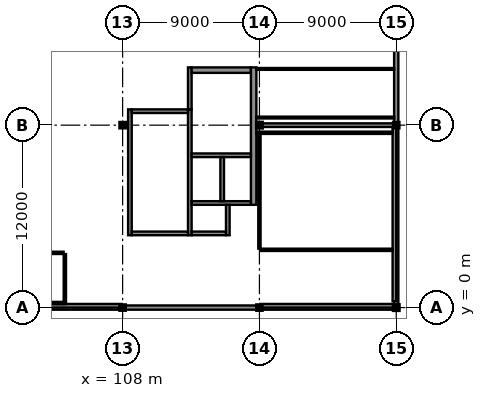
"""IFC4 building model, lengths in metres.
Left out: names, types, materials, properties, quantities, classifications, styles, units other than length and angle.
Written with IfcOpenShell. Run it as: python <this file> out.ifc"""

import sys

from ifc_helpers import new_model, si_unit, direction, frame, frame_2d, origin, origin_2d, place, context, subcontext, project, spatial, rectangle, i_section, extrude, element, fill, save


model = new_model("IFC4")
c1 = context("Model", 3, precision=1e-05, world=origin(), true_north=direction((0.0, 1.0)))
c2 = subcontext(c1, "Body", "Model", "MODEL_VIEW")
j1 = project(units=[si_unit("LENGTHUNIT", "METRE"), si_unit("PLANEANGLEUNIT", "RADIAN")], contexts=[c1])
p1 = place(None, origin())
s1 = spatial("IfcSite", under=j1, at=p1, CompositionType="ELEMENT")
p2 = place(p1, origin())
s2 = spatial("IfcBuilding", under=s1, at=p2, CompositionType="ELEMENT")
p3 = place(p2, frame((0.0, 0.0, 35.4)))
s3 = spatial("IfcBuildingStorey", under=s2, at=p3, CompositionType="ELEMENT", Elevation=35.4)
for number, where, z_axis, x_axis in (
    (1, (108.0, 0.0, 0.0), (0.0, 0.0, 1.0), (1.0, 0.0, 0.0)),
    (2, (108.0, 12.0, 0.0), (0.0, 0.0, 1.0), (1.0, 0.0, 0.0)),
    (3, (117.0, 0.0, 0.0), (0.0, 0.0, 1.0), (1.0, 0.0, 0.0)),
):
    element("IfcColumn", number, at=place(p3, frame(where, z_axis=z_axis, x_axis=x_axis)), inside=s3, PredefinedType="COLUMN", context=c2, shape_type="SweptSolid", body=[
        extrude(i_section(OverallWidth=0.26, OverallDepth=0.26, WebThickness=0.01, FlangeThickness=0.018, at=origin_2d()), origin(), (0.0, 0.0, 1.0), 3.8),
    ])
for number, where, z_axis, x_axis in (
    (4, (117.0, 12.0, 0.0), (0.0, 0.0, 1.0), (0.0, 1.0, 0.0)),
    (5, (126.0, 0.0, 0.0), (0.0, 0.0, 1.0), (1.0, 0.0, 0.0)),
):
    element("IfcColumn", number, at=place(p3, frame(where, z_axis=z_axis, x_axis=x_axis)), inside=s3, PredefinedType="COLUMN", context=c2, shape_type="SweptSolid", body=[
        extrude(i_section(OverallWidth=0.28, OverallDepth=0.28, WebThickness=0.01, FlangeThickness=0.018, at=origin_2d()), origin(), (0.0, 0.0, 1.0), 3.8),
    ])
p4 = place(p3, frame((126.0, 12.0, 0.0), z_axis=(0.0, 0.0, 1.0), x_axis=(1.0, 0.0, 0.0)))
e6 = element("IfcColumn", 6, at=p4, inside=s3, PredefinedType="COLUMN", context=c2, shape_type="SweptSolid", body=[
    extrude(i_section(OverallWidth=0.26, OverallDepth=0.26, WebThickness=0.01, FlangeThickness=0.018, at=origin_2d()), origin(), (0.0, 0.0, 1.0), 3.8),
])
p5 = place(p3, frame((99.058, 0.0, 0.0), z_axis=(0.0, 0.0, 1.0), x_axis=(1.0, 0.0, 0.0)))
e7 = element("IfcWall", 7, at=p5, inside=s3, PredefinedType="SOLIDWALL", context=c2, shape_type="SweptSolid", body=[
    extrude(rectangle(XDim=8.934, YDim=0.28, at=frame_2d((4.467, 0.0))), origin(), (0.0, 0.0, 1.0), 3.305),
])
p6 = place(p5, frame((2.03, 0.0, 1.05)))
e8 = element("IfcOpeningElement", 8, at=p6, cuts=e7, PredefinedType="OPENING", context=c2, shape_type="SweptSolid", body=[
    extrude(rectangle(XDim=1.3, YDim=1.3, at=frame_2d((0.65, 0.65))), frame((0.0, 0.155, 0.0), z_axis=(0.0, -1.0, 0.0), x_axis=(1.0, 0.0, 0.0)), (0.0, 0.0, 1.0), 0.31),
])
p7 = place(p5, frame((5.604, 0.0, 1.05)))
e9 = element("IfcOpeningElement", 9, at=p7, cuts=e7, PredefinedType="OPENING", context=c2, shape_type="SweptSolid", body=[
    extrude(rectangle(XDim=1.3, YDim=1.3, at=frame_2d((0.65, 0.65))), frame((0.0, 0.155, 0.0), z_axis=(0.0, -1.0, 0.0), x_axis=(1.0, 0.0, 0.0)), (0.0, 0.0, 1.0), 0.31),
])
p8 = place(p3, frame((108.008, 0.0, 0.0), z_axis=(0.0, 0.0, 1.0), x_axis=(1.0, 0.0, 0.0)))
e10 = element("IfcWall", 10, at=p8, inside=s3, PredefinedType="SOLIDWALL", context=c2, shape_type="SweptSolid", body=[
    extrude(rectangle(XDim=8.984, YDim=0.28, at=frame_2d((4.492, 0.0))), origin(), (0.0, 0.0, 1.0), 3.305),
])
p9 = place(p8, frame((2.045, 0.0, 1.05)))
e11 = element("IfcOpeningElement", 11, at=p9, cuts=e10, PredefinedType="OPENING", context=c2, shape_type="SweptSolid", body=[
    extrude(rectangle(XDim=1.3, YDim=1.3, at=frame_2d((0.65, 0.65))), frame((0.0, 0.155, 0.0), z_axis=(0.0, -1.0, 0.0), x_axis=(1.0, 0.0, 0.0)), (0.0, 0.0, 1.0), 0.31),
])
p10 = place(p8, frame((5.639, 0.0, 1.05)))
e12 = element("IfcOpeningElement", 12, at=p10, cuts=e10, PredefinedType="OPENING", context=c2, shape_type="SweptSolid", body=[
    extrude(rectangle(XDim=1.3, YDim=1.3, at=frame_2d((0.65, 0.65))), frame((0.0, 0.155, 0.0), z_axis=(0.0, -1.0, 0.0), x_axis=(1.0, 0.0, 0.0)), (0.0, 0.0, 1.0), 0.31),
])
p11 = place(p3, frame((117.008, 0.0, 0.0), z_axis=(0.0, 0.0, 1.0), x_axis=(1.0, 0.0, 0.0)))
e13 = element("IfcWall", 13, at=p11, inside=s3, PredefinedType="SOLIDWALL", context=c2, shape_type="SweptSolid", body=[
    extrude(rectangle(XDim=8.984, YDim=0.28, at=frame_2d((4.492, 0.0))), origin(), (0.0, 0.0, 1.0), 3.305),
])
p12 = place(p11, frame((2.045, 0.0, 1.05)))
e14 = element("IfcOpeningElement", 14, at=p12, cuts=e13, PredefinedType="OPENING", context=c2, shape_type="SweptSolid", body=[
    extrude(rectangle(XDim=1.3, YDim=1.3, at=frame_2d((0.65, 0.65))), frame((0.0, 0.155, 0.0), z_axis=(0.0, -1.0, 0.0), x_axis=(1.0, 0.0, 0.0)), (0.0, 0.0, 1.0), 0.31),
])
p13 = place(p11, frame((5.639, 0.0, 1.05)))
e15 = element("IfcOpeningElement", 15, at=p13, cuts=e13, PredefinedType="OPENING", context=c2, shape_type="SweptSolid", body=[
    extrude(rectangle(XDim=1.3, YDim=1.3, at=frame_2d((0.65, 0.65))), frame((0.0, 0.155, 0.0), z_axis=(0.0, -1.0, 0.0), x_axis=(1.0, 0.0, 0.0)), (0.0, 0.0, 1.0), 0.31),
])
p14 = place(p3, frame((126.0, 0.138, 0.0), z_axis=(0.0, 0.0, 1.0), x_axis=(0.0, 1.0, 0.0)))
e16 = element("IfcWall", 16, at=p14, inside=s3, PredefinedType="SOLIDWALL", context=c2, shape_type="SweptSolid", body=[
    extrude(rectangle(XDim=11.734, YDim=0.28, at=frame_2d((5.867, 0.0))), origin(), (0.0, 0.0, 1.0), 3.195),
])
p15 = place(p14, frame((2.022, 0.0, 1.05)))
e17 = element("IfcOpeningElement", 17, at=p15, cuts=e16, PredefinedType="OPENING", context=c2, shape_type="SweptSolid", body=[
    extrude(rectangle(XDim=1.3, YDim=1.3, at=frame_2d((0.65, 0.65))), frame((0.0, 0.155, 0.0), z_axis=(0.0, -1.0, 0.0), x_axis=(1.0, 0.0, 0.0)), (0.0, 0.0, 1.0), 0.31),
])
p16 = place(p14, frame((7.564, 0.0, 1.05)))
e18 = element("IfcOpeningElement", 18, at=p16, cuts=e16, PredefinedType="OPENING", context=c2, shape_type="SweptSolid", body=[
    extrude(rectangle(XDim=1.3, YDim=1.3, at=frame_2d((0.65, 0.65))), frame((0.0, 0.155, 0.0), z_axis=(0.0, -1.0, 0.0), x_axis=(1.0, 0.0, 0.0)), (0.0, 0.0, 1.0), 0.31),
])
p17 = place(p3, frame((126.0, 12.128, 0.0), z_axis=(0.0, 0.0, 1.0), x_axis=(0.0, 1.0, 0.0)))
e19 = element("IfcWall", 19, at=p17, inside=s3, PredefinedType="SOLIDWALL", context=c2, shape_type="SweptSolid", body=[
    extrude(rectangle(XDim=11.649, YDim=0.28, at=frame_2d((5.825, 0.0))), origin(), (0.0, 0.0, 1.0), 3.195),
])
p18 = place(p17, frame((2.032, 0.0, 1.05)))
e20 = element("IfcOpeningElement", 20, at=p18, cuts=e19, PredefinedType="OPENING", context=c2, shape_type="SweptSolid", body=[
    extrude(rectangle(XDim=1.3, YDim=1.3, at=frame_2d((0.65, 0.65))), frame((0.0, 0.155, 0.0), z_axis=(0.0, -1.0, 0.0), x_axis=(1.0, 0.0, 0.0)), (0.0, 0.0, 1.0), 0.31),
])
p19 = place(p17, frame((7.504, 0.0, 1.05)))
e21 = element("IfcOpeningElement", 21, at=p19, cuts=e19, PredefinedType="OPENING", context=c2, shape_type="SweptSolid", body=[
    extrude(rectangle(XDim=1.3, YDim=1.3, at=frame_2d((0.65, 0.65))), frame((0.0, 0.155, 0.0), z_axis=(0.0, -1.0, 0.0), x_axis=(1.0, 0.0, 0.0)), (0.0, 0.0, 1.0), 0.31),
])
p20 = place(p3, frame((99.06, 0.12, 3.8), z_axis=(0.0, 0.0, 1.0), x_axis=(1.0, 0.0, 0.0)))
e22 = element("IfcWall", 22, at=p20, inside=s3, PredefinedType="PARAPET", context=c2, shape_type="SweptSolid", body=[
    extrude(rectangle(XDim=8.88, YDim=0.24, at=frame_2d((4.44, 0.0))), origin(), (0.0, 0.0, 1.0), 1.1),
])
p21 = place(p3, frame((117.06, 0.12, 3.8), z_axis=(0.0, 0.0, 1.0), x_axis=(1.0, 0.0, 0.0)))
e23 = element("IfcWall", 23, at=p21, inside=s3, PredefinedType="PARAPET", context=c2, shape_type="SweptSolid", body=[
    extrude(rectangle(XDim=8.76, YDim=0.24, at=frame_2d((4.38, 0.0))), origin(), (0.0, 0.0, 1.0), 1.1),
])
p22 = place(p3, frame((125.88, 0.42, 3.8), z_axis=(0.0, 0.0, 1.0), x_axis=(0.0, 1.0, 0.0)))
e24 = element("IfcWall", 24, at=p22, inside=s3, PredefinedType="PARAPET", context=c2, shape_type="SweptSolid", body=[
    extrude(rectangle(XDim=11.52, YDim=0.24, at=frame_2d((5.76, 0.0))), origin(), (0.0, 0.0, 1.0), 1.1),
])
p23 = place(p3, frame((108.48, 4.76, 0.0), z_axis=(0.0, 0.0, 1.0), x_axis=(0.0, 1.0, 0.0)))
e25 = element("IfcWall", 25, at=p23, inside=s3, PredefinedType="SHEAR", context=c2, shape_type="SweptSolid", body=[
    extrude(rectangle(XDim=8.28, YDim=0.24, at=frame_2d((4.14, 0.0))), origin(), (0.0, 0.0, 1.0), 3.81),
])
p24 = place(p3, frame((112.42, 4.76, 0.0), z_axis=(0.0, 0.0, 1.0), x_axis=(0.0, 1.0, 0.0)))
e26 = element("IfcWall", 26, at=p24, inside=s3, PredefinedType="SHEAR", context=c2, shape_type="SweptSolid", body=[
    extrude(rectangle(XDim=8.28, YDim=0.24, at=frame_2d((4.14, 0.0))), origin(), (0.0, 0.0, 1.0), 3.81),
])
p25 = place(p24, frame((6.49, 0.0, 0.0)))
e27 = element("IfcOpeningElement", 27, at=p25, cuts=e26, PredefinedType="OPENING", context=c2, shape_type="SweptSolid", body=[
    extrude(rectangle(XDim=1.3, YDim=2.2, at=frame_2d((0.65, 1.1))), frame((0.0, 0.135, 0.0), z_axis=(0.0, -1.0, 0.0), x_axis=(1.0, 0.0, 0.0)), (0.0, 0.0, 1.0), 0.27),
])
for number, where, z_axis, x_axis in (
    (28, (108.6, 4.88, 0.0), (0.0, 0.0, 1.0), (1.0, 0.0, 0.0)),
    (29, (108.6, 12.92, 0.0), (0.0, 0.0, 1.0), (1.0, 0.0, 0.0)),
):
    element("IfcWall", number, at=place(p3, frame(where, z_axis=z_axis, x_axis=x_axis)), inside=s3, PredefinedType="SHEAR", context=c2, shape_type="SweptSolid", body=[
        extrude(rectangle(XDim=3.7, YDim=0.24, at=frame_2d((1.85, 0.0))), origin(), (0.0, 0.0, 1.0), 3.81),
    ])
p26 = place(p3, frame((112.42, 13.04, 0.0), z_axis=(0.0, 0.0, 1.0), x_axis=(0.0, 1.0, 0.0)))
e30 = element("IfcWall", 30, at=p26, inside=s3, PredefinedType="SHEAR", context=c2, shape_type="SweptSolid", body=[
    extrude(rectangle(XDim=2.76, YDim=0.24, at=frame_2d((1.38, 0.0))), origin(), (0.0, 0.0, 1.0), 3.66),
])
p27 = place(p3, frame((112.54, 15.62, 0.0), z_axis=(0.0, 0.0, 1.0), x_axis=(1.0, 0.0, 0.0)))
e31 = element("IfcWall", 31, at=p27, inside=s3, PredefinedType="SHEAR", context=c2, shape_type="SweptSolid", body=[
    extrude(rectangle(XDim=3.9, YDim=0.36, at=frame_2d((1.95, 0.0))), origin(), (0.0, 0.0, 1.0), 3.66),
])
p28 = place(p27, frame((1.15, 0.0, 0.0)))
e32 = element("IfcOpeningElement", 32, at=p28, cuts=e31, PredefinedType="OPENING", context=c2, shape_type="SweptSolid", body=[
    extrude(rectangle(XDim=1.6, YDim=2.25, at=frame_2d((0.8, 1.125))), frame((0.0, 0.195, 0.0), z_axis=(0.0, -1.0, 0.0), x_axis=(1.0, 0.0, 0.0)), (0.0, 0.0, 1.0), 0.39),
])
p29 = place(p3, frame((116.62, 6.76, 0.0), z_axis=(0.0, 0.0, 1.0), x_axis=(0.0, 1.0, 0.0)))
e33 = element("IfcWall", 33, at=p29, inside=s3, PredefinedType="SHEAR", context=c2, shape_type="SweptSolid", body=[
    extrude(rectangle(XDim=9.04, YDim=0.36, at=frame_2d((4.52, 0.0))), origin(), (0.0, 0.0, 1.0), 3.66),
])
p30 = place(p3, frame((112.54, 10.02, 0.0), z_axis=(0.0, 0.0, 1.0), x_axis=(1.0, 0.0, 0.0)))
e34 = element("IfcWall", 34, at=p30, inside=s3, PredefinedType="SHEAR", context=c2, shape_type="SweptSolid", body=[
    extrude(rectangle(XDim=3.9, YDim=0.24, at=frame_2d((1.95, 0.0))), origin(), (0.0, 0.0, 1.0), 3.81),
])
p31 = place(p30, frame((0.235, 0.0, 0.0)))
e35 = element("IfcOpeningElement", 35, at=p31, cuts=e34, PredefinedType="OPENING", context=c2, shape_type="SweptSolid", body=[
    extrude(rectangle(XDim=1.6, YDim=2.3, at=frame_2d((0.8, 1.15))), frame((0.0, 0.135, 0.0), z_axis=(0.0, -1.0, 0.0), x_axis=(1.0, 0.0, 0.0)), (0.0, 0.0, 1.0), 0.27),
])
p32 = place(p30, frame((2.185, 0.0, 0.0)))
e36 = element("IfcOpeningElement", 36, at=p32, cuts=e34, PredefinedType="OPENING", context=c2, shape_type="SweptSolid", body=[
    extrude(rectangle(XDim=1.6, YDim=2.3, at=frame_2d((0.8, 1.15))), frame((0.0, 0.135, 0.0), z_axis=(0.0, -1.0, 0.0), x_axis=(1.0, 0.0, 0.0)), (0.0, 0.0, 1.0), 0.27),
])
p33 = place(p3, frame((112.54, 6.88, 0.0), z_axis=(0.0, 0.0, 1.0), x_axis=(1.0, 0.0, 0.0)))
e37 = element("IfcWall", 37, at=p33, inside=s3, PredefinedType="SHEAR", context=c2, shape_type="SweptSolid", body=[
    extrude(rectangle(XDim=3.9, YDim=0.24, at=frame_2d((1.95, 0.0))), origin(), (0.0, 0.0, 1.0), 3.81),
])
p34 = place(p3, frame((114.55, 7.0, 0.0), z_axis=(0.0, 0.0, 1.0), x_axis=(0.0, 1.0, 0.0)))
e38 = element("IfcWall", 38, at=p34, inside=s3, PredefinedType="SHEAR", context=c2, shape_type="SweptSolid", body=[
    extrude(rectangle(XDim=2.9, YDim=0.24, at=frame_2d((1.45, 0.0))), origin(), (0.0, 0.0, 1.0), 3.81),
])
p35 = place(p3, frame((114.92, 4.76, 0.0), z_axis=(0.0, 0.0, 1.0), x_axis=(0.0, 1.0, 0.0)))
e39 = element("IfcWall", 39, at=p35, inside=s3, PredefinedType="SHEAR", context=c2, shape_type="SweptSolid", body=[
    extrude(rectangle(XDim=2.0, YDim=0.24, at=frame_2d((1.0, 0.0))), origin(), (0.0, 0.0, 1.0), 3.81),
])
p36 = place(p3, frame((112.54, 4.88, 0.0), z_axis=(0.0, 0.0, 1.0), x_axis=(1.0, 0.0, 0.0)))
e40 = element("IfcWall", 40, at=p36, inside=s3, PredefinedType="SHEAR", context=c2, shape_type="SweptSolid", body=[
    extrude(rectangle(XDim=2.26, YDim=0.24, at=frame_2d((1.13, 0.0))), origin(), (0.0, 0.0, 1.0), 3.81),
])
p37 = place(p3, frame((117.138, 12.0, 0.0), z_axis=(0.0, 0.0, 1.0), x_axis=(1.0, 0.0, 0.0)))
e41 = element("IfcWall", 41, at=p37, inside=s3, PredefinedType="SHEAR", context=c2, shape_type="SweptSolid", body=[
    extrude(rectangle(XDim=8.854, YDim=0.24, at=frame_2d((4.427, 0.0))), origin(), (0.0, 0.0, 1.0), 3.255),
])
p38 = place(p3, frame((45.88, 3.6, 0.0), z_axis=(0.0, 0.0, 1.0), x_axis=(1.0, 0.0, 0.0)))
e42 = element("IfcWall", 42, at=p38, inside=s3, PredefinedType="PARTITIONING", context=c2, shape_type="SweptSolid", body=[
    extrude(rectangle(XDim=58.24, YDim=0.15, at=frame_2d((29.12, 0.0))), origin(), (0.0, 0.0, 1.0), 3.64),
])
p39 = place(p38, frame((27.795, 0.0, 0.0)))
e43 = element("IfcOpeningElement", 43, at=p39, cuts=e42, PredefinedType="OPENING", context=c2, shape_type="SweptSolid", body=[
    extrude(rectangle(XDim=1.05, YDim=2.25, at=frame_2d((0.525, 1.125))), frame((0.0, 0.09, 0.0), z_axis=(0.0, -1.0, 0.0), x_axis=(1.0, 0.0, 0.0)), (0.0, 0.0, 1.0), 0.18),
])
p40 = place(p3, frame((104.2, 3.52, 0.0), z_axis=(0.0, 0.0, 1.0), x_axis=(0.0, -1.0, 0.0)))
e44 = element("IfcWall", 44, at=p40, inside=s3, PredefinedType="PARTITIONING", context=c2, shape_type="SweptSolid", body=[
    extrude(rectangle(XDim=3.285, YDim=0.15, at=frame_2d((1.643, 0.0))), origin(), (0.0, 0.0, 1.0), 3.64),
])
p41 = place(p3, frame((104.13, 0.3, 0.0), z_axis=(0.0, 0.0, 1.0), x_axis=(-1.0, 0.0, 0.0)))
e45 = element("IfcWall", 45, at=p41, inside=s3, PredefinedType="PARTITIONING", context=c2, shape_type="SweptSolid", body=[
    extrude(rectangle(XDim=31.851, YDim=0.15, at=frame_2d((15.925, 0.0))), origin(), (0.0, 0.0, 1.0), 3.64),
])
p42 = place(p3, frame((117.0, 3.88, 0.0), z_axis=(0.0, 0.0, 1.0), x_axis=(0.0, 1.0, 0.0)))
e46 = element("IfcWall", 46, at=p42, inside=s3, PredefinedType="PARTITIONING", context=c2, shape_type="SweptSolid", body=[
    extrude(rectangle(XDim=7.54, YDim=0.15, at=frame_2d((3.77, 0.0))), origin(), (0.0, 0.0, 1.0), 3.245),
])
p43 = place(p3, frame((116.795, 11.5, 0.0), z_axis=(0.0, 0.0, 1.0), x_axis=(1.0, 0.0, 0.0)))
e47 = element("IfcWall", 47, at=p43, inside=s3, PredefinedType="PARTITIONING", context=c2, shape_type="SweptSolid", body=[
    extrude(rectangle(XDim=8.97, YDim=0.15, at=frame_2d((4.485, 0.0))), origin(), (0.0, 0.0, 1.0), 3.64),
])
p44 = place(p3, frame((125.765, 3.8, 0.0), z_axis=(0.0, 0.0, 1.0), x_axis=(-1.0, 0.0, 0.0)))
e48 = element("IfcWall", 48, at=p44, inside=s3, PredefinedType="PARTITIONING", context=c2, shape_type="SweptSolid", body=[
    extrude(rectangle(XDim=8.685, YDim=0.15, at=frame_2d((4.342, 0.0))), origin(), (0.0, 0.0, 1.0), 3.64),
])
p45 = place(p44, frame((3.818, 0.0, 0.0)))
e49 = element("IfcOpeningElement", 49, at=p45, cuts=e48, PredefinedType="OPENING", context=c2, shape_type="SweptSolid", body=[
    extrude(rectangle(XDim=1.05, YDim=2.25, at=frame_2d((0.525, 1.125))), frame((0.0, 0.09, 0.0), z_axis=(0.0, -1.0, 0.0), x_axis=(1.0, 0.0, 0.0)), (0.0, 0.0, 1.0), 0.18),
])
p46 = place(p3, frame((125.865, 12.5, 0.0), z_axis=(0.0, 0.0, 1.0), x_axis=(-1.0, 0.0, 0.0)))
e50 = element("IfcWall", 50, at=p46, inside=s3, PredefinedType="PARTITIONING", context=c2, shape_type="SweptSolid", body=[
    extrude(rectangle(XDim=9.07, YDim=0.12, at=frame_2d((4.535, 0.0))), origin(), (0.0, 0.0, 1.0), 3.64),
])
p47 = place(p3, frame((116.795, 15.7, 0.0), z_axis=(0.0, 0.0, 1.0), x_axis=(1.0, 0.0, 0.0)))
e51 = element("IfcWall", 51, at=p47, inside=s3, PredefinedType="PARTITIONING", context=c2, shape_type="SweptSolid", body=[
    extrude(rectangle(XDim=9.07, YDim=0.12, at=frame_2d((4.535, 0.0))), origin(), (0.0, 0.0, 1.0), 3.64),
])
p48 = place(p47, frame((4.06, 0.0, 0.0)))
e52 = element("IfcOpeningElement", 52, at=p48, cuts=e51, PredefinedType="OPENING", context=c2, shape_type="SweptSolid", body=[
    extrude(rectangle(XDim=0.95, YDim=2.15, at=frame_2d((0.475, 1.075))), frame((0.0, 0.075, 0.0), z_axis=(0.0, -1.0, 0.0), x_axis=(1.0, 0.0, 0.0)), (0.0, 0.0, 1.0), 0.15),
])
p49 = place(p7, origin())
e53 = element("IfcWindow", 53, at=p49, inside=s3, PartitioningType="SINGLE_PANEL", PredefinedType="WINDOW", context=c2, shape_type="SweptSolid", body=[
    extrude(rectangle(XDim=1.3, YDim=1.3, at=frame_2d((0.65, 0.65))), frame((0.0, 0.03, 0.0), z_axis=(0.0, -1.0, 0.0), x_axis=(1.0, 0.0, 0.0)), (0.0, 0.0, 1.0), 0.06),
])
fill(e9, e53)
p50 = place(p9, origin())
e54 = element("IfcWindow", 54, at=p50, inside=s3, PartitioningType="SINGLE_PANEL", PredefinedType="WINDOW", context=c2, shape_type="SweptSolid", body=[
    extrude(rectangle(XDim=1.3, YDim=1.3, at=frame_2d((0.65, 0.65))), frame((0.0, 0.03, 0.0), z_axis=(0.0, -1.0, 0.0), x_axis=(1.0, 0.0, 0.0)), (0.0, 0.0, 1.0), 0.06),
])
fill(e11, e54)
p51 = place(p10, origin())
e55 = element("IfcWindow", 55, at=p51, inside=s3, PartitioningType="SINGLE_PANEL", PredefinedType="WINDOW", context=c2, shape_type="SweptSolid", body=[
    extrude(rectangle(XDim=1.3, YDim=1.3, at=frame_2d((0.65, 0.65))), frame((0.0, 0.03, 0.0), z_axis=(0.0, -1.0, 0.0), x_axis=(1.0, 0.0, 0.0)), (0.0, 0.0, 1.0), 0.06),
])
fill(e12, e55)
p52 = place(p12, origin())
e56 = element("IfcWindow", 56, at=p52, inside=s3, PartitioningType="SINGLE_PANEL", PredefinedType="WINDOW", context=c2, shape_type="SweptSolid", body=[
    extrude(rectangle(XDim=1.3, YDim=1.3, at=frame_2d((0.65, 0.65))), frame((0.0, 0.03, 0.0), z_axis=(0.0, -1.0, 0.0), x_axis=(1.0, 0.0, 0.0)), (0.0, 0.0, 1.0), 0.06),
])
fill(e14, e56)
p53 = place(p13, origin())
e57 = element("IfcWindow", 57, at=p53, inside=s3, PartitioningType="SINGLE_PANEL", PredefinedType="WINDOW", context=c2, shape_type="SweptSolid", body=[
    extrude(rectangle(XDim=1.3, YDim=1.3, at=frame_2d((0.65, 0.65))), frame((0.0, 0.03, 0.0), z_axis=(0.0, -1.0, 0.0), x_axis=(1.0, 0.0, 0.0)), (0.0, 0.0, 1.0), 0.06),
])
fill(e15, e57)
p54 = place(p15, origin())
e58 = element("IfcWindow", 58, at=p54, inside=s3, PartitioningType="SINGLE_PANEL", PredefinedType="WINDOW", context=c2, shape_type="SweptSolid", body=[
    extrude(rectangle(XDim=1.3, YDim=1.3, at=frame_2d((0.65, 0.65))), frame((0.0, 0.03, 0.0), z_axis=(0.0, -1.0, 0.0), x_axis=(1.0, 0.0, 0.0)), (0.0, 0.0, 1.0), 0.06),
])
fill(e17, e58)
p55 = place(p16, origin())
e59 = element("IfcWindow", 59, at=p55, inside=s3, PartitioningType="SINGLE_PANEL", PredefinedType="WINDOW", context=c2, shape_type="SweptSolid", body=[
    extrude(rectangle(XDim=1.3, YDim=1.3, at=frame_2d((0.65, 0.65))), frame((0.0, 0.03, 0.0), z_axis=(0.0, -1.0, 0.0), x_axis=(1.0, 0.0, 0.0)), (0.0, 0.0, 1.0), 0.06),
])
fill(e18, e59)
p56 = place(p18, origin())
e60 = element("IfcWindow", 60, at=p56, inside=s3, PartitioningType="SINGLE_PANEL", PredefinedType="WINDOW", context=c2, shape_type="SweptSolid", body=[
    extrude(rectangle(XDim=1.3, YDim=1.3, at=frame_2d((0.65, 0.65))), frame((0.0, 0.03, 0.0), z_axis=(0.0, -1.0, 0.0), x_axis=(1.0, 0.0, 0.0)), (0.0, 0.0, 1.0), 0.06),
])
fill(e20, e60)
p57 = place(p25, frame((1.3, 0.0, 0.0), z_axis=(0.0, 0.0, 1.0), x_axis=(-1.0, 0.0, 0.0)))
e61 = element("IfcDoor", 61, at=p57, inside=s3, OperationType="SINGLE_SWING_RIGHT", PredefinedType="DOOR", context=c2, shape_type="SweptSolid", body=[
    extrude(rectangle(XDim=1.3, YDim=2.2, at=frame_2d((0.65, 1.1))), frame((0.0, 0.025, 0.0), z_axis=(0.0, -1.0, 0.0), x_axis=(1.0, 0.0, 0.0)), (0.0, 0.0, 1.0), 0.05),
])
fill(e27, e61)
p58 = place(p28, origin())
e62 = element("IfcDoor", 62, at=p58, inside=s3, OperationType="DOUBLE_DOOR_SINGLE_SWING", PredefinedType="DOOR", context=c2, shape_type="SweptSolid", body=[
    extrude(rectangle(XDim=1.6, YDim=2.25, at=frame_2d((0.8, 1.125))), frame((0.0, 0.025, 0.0), z_axis=(0.0, -1.0, 0.0), x_axis=(1.0, 0.0, 0.0)), (0.0, 0.0, 1.0), 0.05),
])
fill(e32, e62)
p59 = place(p31, origin())
e63 = element("IfcDoor", 63, at=p59, inside=s3, OperationType="DOUBLE_DOOR_SLIDING", PredefinedType="DOOR", context=c2, shape_type="SweptSolid", body=[
    extrude(rectangle(XDim=1.6, YDim=2.3, at=frame_2d((0.8, 1.15))), frame((0.0, 0.025, 0.0), z_axis=(0.0, -1.0, 0.0), x_axis=(1.0, 0.0, 0.0)), (0.0, 0.0, 1.0), 0.05),
])
fill(e35, e63)
p60 = place(p32, origin())
e64 = element("IfcDoor", 64, at=p60, inside=s3, OperationType="DOUBLE_DOOR_SLIDING", PredefinedType="DOOR", context=c2, shape_type="SweptSolid", body=[
    extrude(rectangle(XDim=1.6, YDim=2.3, at=frame_2d((0.8, 1.15))), frame((0.0, 0.025, 0.0), z_axis=(0.0, -1.0, 0.0), x_axis=(1.0, 0.0, 0.0)), (0.0, 0.0, 1.0), 0.05),
])
fill(e36, e64)
p61 = place(p45, frame((1.05, 0.0, 0.0), z_axis=(0.0, 0.0, 1.0), x_axis=(-1.0, 0.0, 0.0)))
e65 = element("IfcDoor", 65, at=p61, inside=s3, OperationType="SINGLE_SWING_LEFT", PredefinedType="DOOR", context=c2, shape_type="SweptSolid", body=[
    extrude(rectangle(XDim=1.05, YDim=2.25, at=frame_2d((0.525, 1.125))), frame((0.0, 0.025, 0.0), z_axis=(0.0, -1.0, 0.0), x_axis=(1.0, 0.0, 0.0)), (0.0, 0.0, 1.0), 0.05),
])
fill(e49, e65)
p62 = place(p48, origin())
e66 = element("IfcDoor", 66, at=p62, inside=s3, OperationType="SINGLE_SWING_RIGHT", PredefinedType="DOOR", context=c2, shape_type="SweptSolid", body=[
    extrude(rectangle(XDim=0.95, YDim=2.15, at=frame_2d((0.475, 1.075))), frame((0.0, 0.025, 0.0), z_axis=(0.0, -1.0, 0.0), x_axis=(1.0, 0.0, 0.0)), (0.0, 0.0, 1.0), 0.05),
])
fill(e52, e66)
save(model, sys.argv[1])
